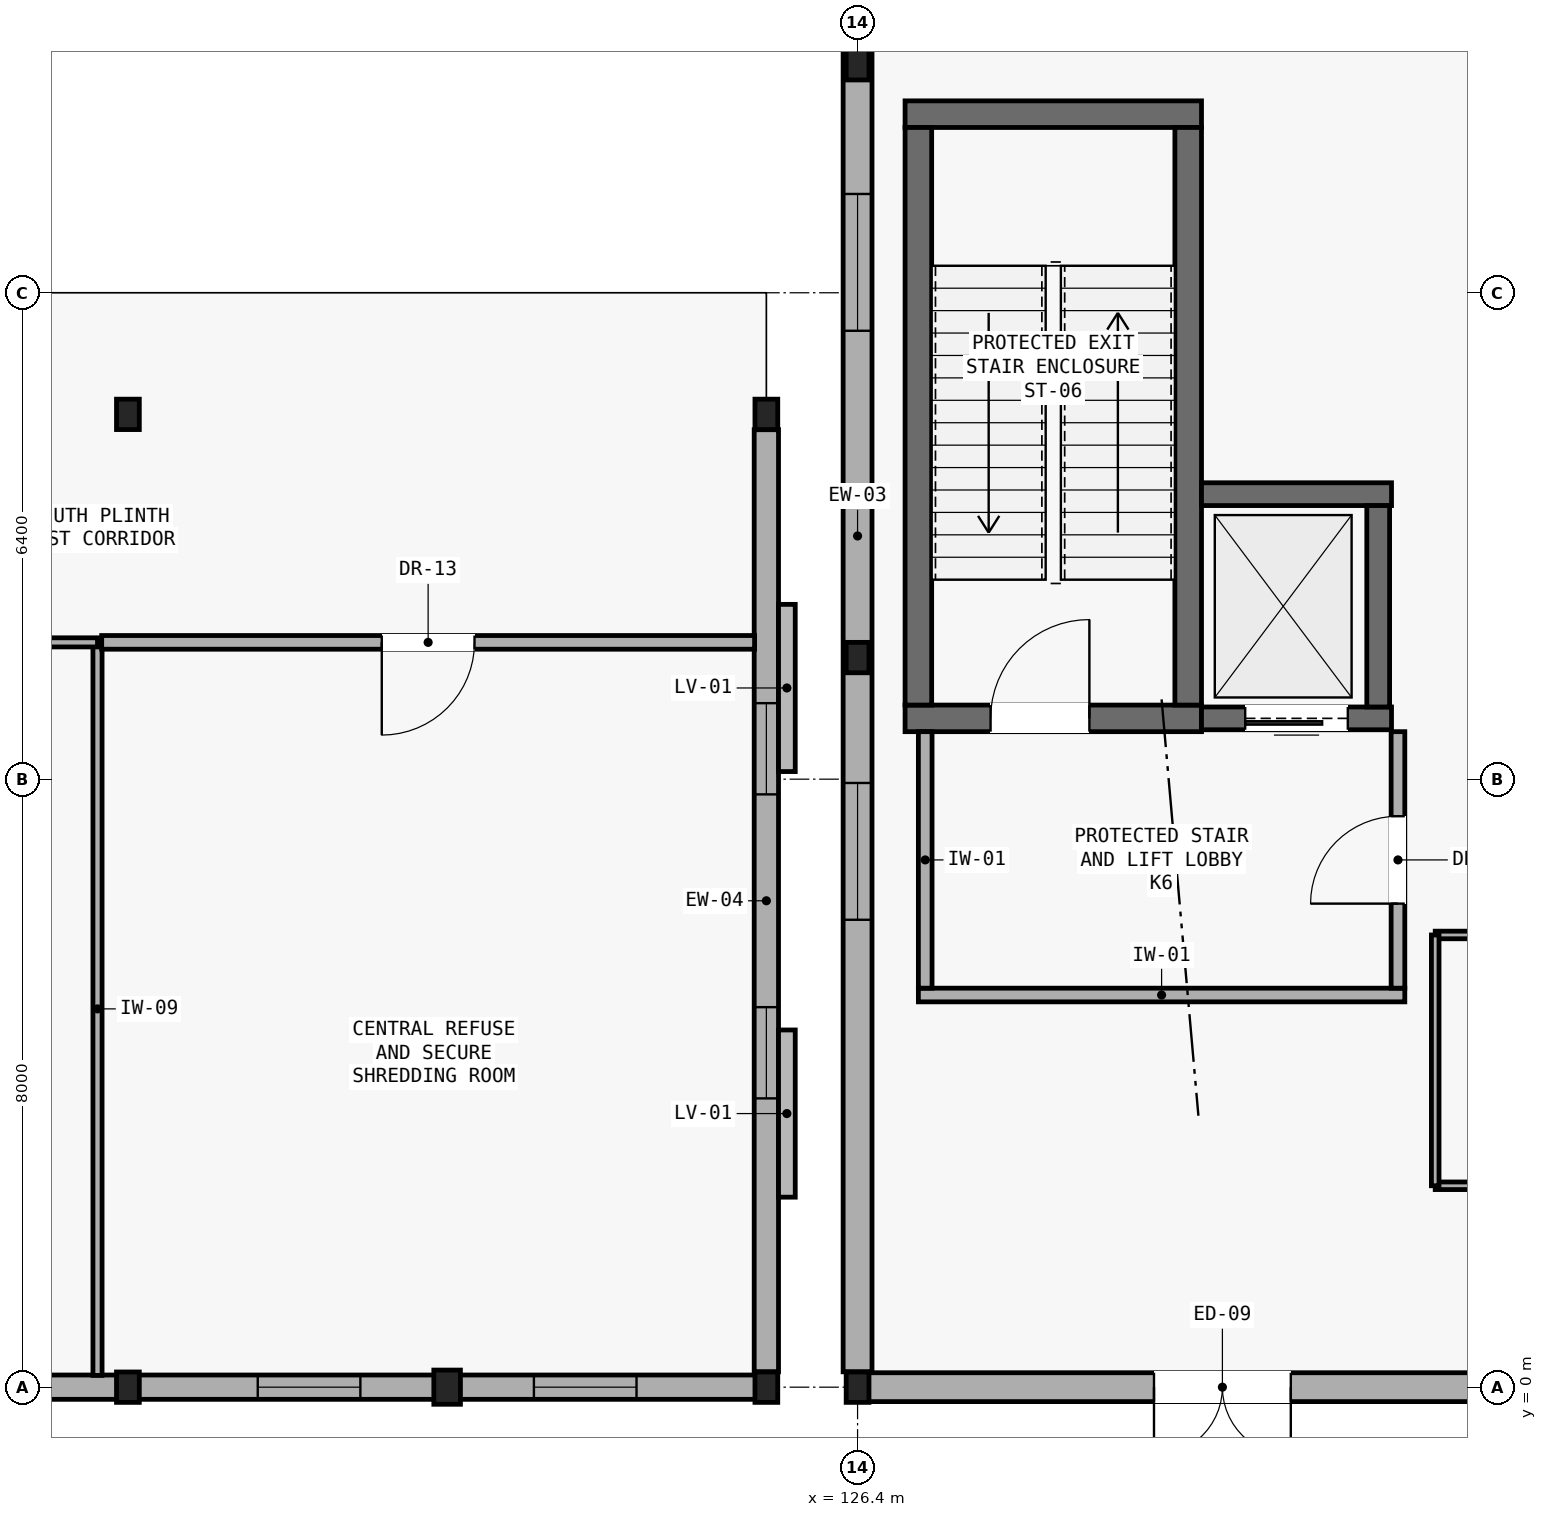
"""IFC4 building model, lengths in metres.
Left out: names, types, materials, properties, quantities, classifications, styles, units other than length and angle.
Written with IfcOpenShell. Run it as: python <this file> out.ifc"""

import sys

from ifc_helpers import new_model, si_unit, direction, frame, frame_2d, origin, origin_2d, place, context, subcontext, project, spatial, rectangle, i_section, extrude, element, fill, save


model = new_model("IFC4")
c1 = context("Model", 3, precision=1e-05, world=origin(), true_north=direction((0.0, 1.0)))
c2 = subcontext(c1, "Body", "Model", "MODEL_VIEW")
j1 = project(units=[si_unit("LENGTHUNIT", "METRE"), si_unit("PLANEANGLEUNIT", "RADIAN")], contexts=[c1])
p1 = place(None, origin())
s1 = spatial("IfcSite", under=j1, at=p1, CompositionType="ELEMENT")
p2 = place(p1, origin())
s2 = spatial("IfcBuilding", under=s1, at=p2, CompositionType="ELEMENT")
p3 = place(p2, origin())
s3 = spatial("IfcBuildingStorey", under=s2, at=p3, CompositionType="ELEMENT", Elevation=0.0)
for number, where, z_axis, x_axis in (
    (1, (126.4, 0.0, -0.27), (0.0, 0.0, 1.0), (1.0, 0.0, 0.0)),
    (2, (126.4, 9.6, -0.27), (0.0, 0.0, 1.0), (1.0, 0.0, 0.0)),
    (3, (126.4, 17.4, -0.27), (0.0, 0.0, 1.0), (1.0, 0.0, 0.0)),
    (4, (116.8, 0.0, -0.27), (0.0, 0.0, 1.0), (1.0, 0.0, 0.0)),
    (5, (116.8, 12.8, -0.27), (0.0, 0.0, 1.0), (1.0, 0.0, 0.0)),
    (6, (125.2, 0.0, -0.27), (0.0, 0.0, 1.0), (1.0, 0.0, 0.0)),
    (7, (125.2, 12.8, -0.27), (0.0, 0.0, 1.0), (1.0, 0.0, 0.0)),
):
    element("IfcColumn", number, at=place(p3, frame(where, z_axis=z_axis, x_axis=x_axis)), inside=s3, PredefinedType="COLUMN", context=c2, shape_type="SweptSolid", body=[
        extrude(i_section(OverallWidth=0.3, OverallDepth=0.4, WebThickness=0.013, FlangeThickness=0.024, FilletRadius=0.027, at=origin_2d()), origin(), (0.0, 0.0, 1.0), 5.52),
    ])
p4 = place(p3, frame((121.0, 0.0, -0.27), z_axis=(0.0, 0.0, 1.0), x_axis=(1.0, 0.0, 0.0)))
e8 = element("IfcColumn", 8, at=p4, inside=s3, PredefinedType="PILASTER", context=c2, shape_type="SweptSolid", body=[
    extrude(rectangle(XDim=0.35, YDim=0.45, at=origin_2d()), origin(), (0.0, 0.0, 1.0), 5.27),
])
p5 = place(p3, frame((126.409, 0.0, 0.0), z_axis=(0.0, 0.0, 1.0), x_axis=(1.0, 0.0, 0.0)))
e9 = element("IfcWall", 9, at=p5, inside=s3, PredefinedType="SOLIDWALL", context=c2, shape_type="SweptSolid", body=[
    extrude(rectangle(XDim=9.583, YDim=0.38, at=frame_2d((4.791, 0.0))), origin(), (0.0, 0.0, 1.0), 4.67),
])
p6 = place(p5, frame((3.891, 0.0, 0.0)))
e10 = element("IfcOpeningElement", 10, at=p6, cuts=e9, PredefinedType="OPENING", context=c2, shape_type="SweptSolid", body=[
    extrude(rectangle(XDim=1.8, YDim=2.2, at=frame_2d((0.9, 1.1))), frame((0.0, 0.2, 0.0), z_axis=(0.0, -1.0, 0.0), x_axis=(1.0, 0.0, 0.0)), (0.0, 0.0, 1.0), 0.4),
])
p7 = place(p3, frame((126.4, 0.202, 0.0), z_axis=(0.0, 0.0, 1.0), x_axis=(0.0, 1.0, 0.0)))
e11 = element("IfcWall", 11, at=p7, inside=s3, PredefinedType="SOLIDWALL", context=c2, shape_type="SweptSolid", body=[
    extrude(rectangle(XDim=21.996, YDim=0.38, at=frame_2d((10.998, 0.0))), origin(), (0.0, 0.0, 1.0), 4.54),
])
p8 = place(p7, frame((5.948, 0.0, 1.7)))
e12 = element("IfcOpeningElement", 12, at=p8, cuts=e11, PredefinedType="OPENING", context=c2, shape_type="SweptSolid", body=[
    extrude(rectangle(XDim=1.8, YDim=0.85, at=frame_2d((0.9, 0.425))), frame((0.0, 0.2, 0.0), z_axis=(0.0, -1.0, 0.0), x_axis=(1.0, 0.0, 0.0)), (0.0, 0.0, 1.0), 0.4),
])
p9 = place(p7, frame((13.698, 0.0, 1.7)))
e13 = element("IfcOpeningElement", 13, at=p9, cuts=e11, PredefinedType="OPENING", context=c2, shape_type="SweptSolid", body=[
    extrude(rectangle(XDim=1.8, YDim=0.85, at=frame_2d((0.9, 0.425))), frame((0.0, 0.2, 0.0), z_axis=(0.0, -1.0, 0.0), x_axis=(1.0, 0.0, 0.0)), (0.0, 0.0, 1.0), 0.4),
])
p10 = place(p3, frame((108.809, 0.0, 0.0), z_axis=(0.0, 0.0, 1.0), x_axis=(1.0, 0.0, 0.0)))
e14 = element("IfcWall", 14, at=p10, inside=s3, PredefinedType="SOLIDWALL", context=c2, shape_type="SweptSolid", body=[
    extrude(rectangle(XDim=7.982, YDim=0.32, at=frame_2d((3.991, 0.0))), origin(), (0.0, 0.0, 1.0), 4.67),
])
p11 = place(p10, frame((3.391, 0.0, 0.9)))
e15 = element("IfcOpeningElement", 15, at=p11, cuts=e14, PredefinedType="OPENING", context=c2, shape_type="SweptSolid", body=[
    extrude(rectangle(XDim=1.2, YDim=1.55, at=frame_2d((0.6, 0.775))), frame((0.0, 0.17, 0.0), z_axis=(0.0, -1.0, 0.0), x_axis=(1.0, 0.0, 0.0)), (0.0, 0.0, 1.0), 0.34),
])
p12 = place(p3, frame((116.809, 0.0, 0.0), z_axis=(0.0, 0.0, 1.0), x_axis=(1.0, 0.0, 0.0)))
e16 = element("IfcWall", 16, at=p12, inside=s3, PredefinedType="SOLIDWALL", context=c2, shape_type="SweptSolid", body=[
    extrude(rectangle(XDim=8.382, YDim=0.32, at=frame_2d((4.191, 0.0))), origin(), (0.0, 0.0, 1.0), 4.67),
])
p13 = place(p12, frame((1.7, 0.0, 0.9)))
e17 = element("IfcOpeningElement", 17, at=p13, cuts=e16, PredefinedType="OPENING", context=c2, shape_type="SweptSolid", body=[
    extrude(rectangle(XDim=1.35, YDim=1.55, at=frame_2d((0.675, 0.775))), frame((0.0, 0.17, 0.0), z_axis=(0.0, -1.0, 0.0), x_axis=(1.0, 0.0, 0.0)), (0.0, 0.0, 1.0), 0.34),
])
p14 = place(p12, frame((5.333, 0.0, 0.9)))
e18 = element("IfcOpeningElement", 18, at=p14, cuts=e16, PredefinedType="OPENING", context=c2, shape_type="SweptSolid", body=[
    extrude(rectangle(XDim=1.35, YDim=1.55, at=frame_2d((0.675, 0.775))), frame((0.0, 0.17, 0.0), z_axis=(0.0, -1.0, 0.0), x_axis=(1.0, 0.0, 0.0)), (0.0, 0.0, 1.0), 0.34),
])
p15 = place(p3, frame((125.2, 0.202, 0.0), z_axis=(0.0, 0.0, 1.0), x_axis=(0.0, 1.0, 0.0)))
e19 = element("IfcWall", 19, at=p15, inside=s3, PredefinedType="SOLIDWALL", context=c2, shape_type="SweptSolid", body=[
    extrude(rectangle(XDim=12.396, YDim=0.32, at=frame_2d((6.198, 0.0))), origin(), (0.0, 0.0, 1.0), 4.59),
])
p16 = place(p15, frame((3.598, 0.0, 0.9)))
e20 = element("IfcOpeningElement", 20, at=p16, cuts=e19, PredefinedType="OPENING", context=c2, shape_type="SweptSolid", body=[
    extrude(rectangle(XDim=1.2, YDim=1.15, at=frame_2d((0.6, 0.575))), frame((0.0, 0.17, 0.0), z_axis=(0.0, -1.0, 0.0), x_axis=(1.0, 0.0, 0.0)), (0.0, 0.0, 1.0), 0.34),
])
p17 = place(p15, frame((7.598, 0.0, 0.9)))
e21 = element("IfcOpeningElement", 21, at=p17, cuts=e19, PredefinedType="OPENING", context=c2, shape_type="SweptSolid", body=[
    extrude(rectangle(XDim=1.2, YDim=1.15, at=frame_2d((0.6, 0.575))), frame((0.0, 0.17, 0.0), z_axis=(0.0, -1.0, 0.0), x_axis=(1.0, 0.0, 0.0)), (0.0, 0.0, 1.0), 0.34),
])
p18 = place(p3, frame((127.025, 8.8, -0.27), z_axis=(0.0, 0.0, 1.0), x_axis=(1.0, 0.0, 0.0)))
e22 = element("IfcWall", 22, at=p18, inside=s3, PredefinedType="SHEAR", context=c2, shape_type="SweptSolid", body=[
    extrude(rectangle(XDim=3.9, YDim=0.35, at=frame_2d((1.95, 0.0))), origin(), (0.0, 0.0, 1.0), 5.27),
])
p19 = place(p18, frame((1.125, 0.0, 0.27)))
e23 = element("IfcOpeningElement", 23, at=p19, cuts=e22, PredefinedType="OPENING", context=c2, shape_type="SweptSolid", body=[
    extrude(rectangle(XDim=1.3, YDim=2.15, at=frame_2d((0.65, 1.075))), frame((0.0, 0.185, 0.0), z_axis=(0.0, -1.0, 0.0), x_axis=(1.0, 0.0, 0.0)), (0.0, 0.0, 1.0), 0.37),
])
p20 = place(p3, frame((127.025, 16.75, -0.27), z_axis=(0.0, 0.0, 1.0), x_axis=(1.0, 0.0, 0.0)))
e24 = element("IfcWall", 24, at=p20, inside=s3, PredefinedType="SHEAR", context=c2, shape_type="SweptSolid", body=[
    extrude(rectangle(XDim=3.9, YDim=0.35, at=frame_2d((1.95, 0.0))), origin(), (0.0, 0.0, 1.0), 5.27),
])
for number, where, z_axis, x_axis in (
    (25, (127.2, 8.975, -0.27), (0.0, 0.0, 1.0), (0.0, 1.0, 0.0)),
    (26, (130.75, 8.975, -0.27), (0.0, 0.0, 1.0), (0.0, 1.0, 0.0)),
):
    element("IfcWall", number, at=place(p3, frame(where, z_axis=z_axis, x_axis=x_axis)), inside=s3, PredefinedType="SHEAR", context=c2, shape_type="SweptSolid", body=[
        extrude(rectangle(XDim=7.6, YDim=0.35, at=frame_2d((3.8, 0.0))), origin(), (0.0, 0.0, 1.0), 5.27),
    ])
p21 = place(p3, frame((130.925, 8.8, -0.27), z_axis=(0.0, 0.0, 1.0), x_axis=(1.0, 0.0, 0.0)))
e27 = element("IfcWall", 27, at=p21, inside=s3, PredefinedType="SHEAR", context=c2, shape_type="SweptSolid", body=[
    extrude(rectangle(XDim=2.5, YDim=0.3, at=frame_2d((1.25, 0.0))), origin(), (0.0, 0.0, 1.0), 5.27),
])
p22 = place(p21, frame((0.575, 0.0, 0.27)))
e28 = element("IfcOpeningElement", 28, at=p22, cuts=e27, PredefinedType="OPENING", context=c2, shape_type="SweptSolid", body=[
    extrude(rectangle(XDim=1.35, YDim=2.15, at=frame_2d((0.675, 1.075))), frame((0.0, 0.16, 0.0), z_axis=(0.0, -1.0, 0.0), x_axis=(1.0, 0.0, 0.0)), (0.0, 0.0, 1.0), 0.32),
])
p23 = place(p3, frame((130.925, 11.75, -0.27), z_axis=(0.0, 0.0, 1.0), x_axis=(1.0, 0.0, 0.0)))
e29 = element("IfcWall", 29, at=p23, inside=s3, PredefinedType="SHEAR", context=c2, shape_type="SweptSolid", body=[
    extrude(rectangle(XDim=2.5, YDim=0.3, at=frame_2d((1.25, 0.0))), origin(), (0.0, 0.0, 1.0), 5.27),
])
p24 = place(p3, frame((133.25, 8.95, -0.27), z_axis=(0.0, 0.0, 1.0), x_axis=(0.0, 1.0, 0.0)))
e30 = element("IfcWall", 30, at=p24, inside=s3, PredefinedType="SHEAR", context=c2, shape_type="SweptSolid", body=[
    extrude(rectangle(XDim=2.65, YDim=0.3, at=frame_2d((1.325, 0.0))), origin(), (0.0, 0.0, 1.0), 5.27),
])
p25 = place(p3, frame((127.2, 5.16, 0.0), z_axis=(0.0, 0.0, 1.0), x_axis=(1.0, 0.0, 0.0)))
e31 = element("IfcWall", 31, at=p25, inside=s3, PredefinedType="PARTITIONING", context=c2, shape_type="SweptSolid", body=[
    extrude(rectangle(XDim=6.4, YDim=0.18, at=frame_2d((3.2, 0.0))), origin(), (0.0, 0.0, 1.0), 5.0),
])
p26 = place(p3, frame((127.29, 5.25, 0.0), z_axis=(0.0, 0.0, 1.0), x_axis=(0.0, 1.0, 0.0)))
e32 = element("IfcWall", 32, at=p26, inside=s3, PredefinedType="PARTITIONING", context=c2, shape_type="SweptSolid", body=[
    extrude(rectangle(XDim=3.375, YDim=0.18, at=frame_2d((1.688, 0.0))), origin(), (0.0, 0.0, 1.0), 5.0),
])
p27 = place(p3, frame((133.51, 5.25, 0.0), z_axis=(0.0, 0.0, 1.0), x_axis=(0.0, 1.0, 0.0)))
e33 = element("IfcWall", 33, at=p27, inside=s3, PredefinedType="PARTITIONING", context=c2, shape_type="SweptSolid", body=[
    extrude(rectangle(XDim=3.375, YDim=0.18, at=frame_2d((1.688, 0.0))), origin(), (0.0, 0.0, 1.0), 5.0),
])
p28 = place(p27, frame((1.113, 0.0, 0.0)))
e34 = element("IfcOpeningElement", 34, at=p28, cuts=e33, PredefinedType="OPENING", context=c2, shape_type="SweptSolid", body=[
    extrude(rectangle(XDim=1.15, YDim=2.15, at=frame_2d((0.575, 1.075))), frame((0.0, 0.1, 0.0), z_axis=(0.0, -1.0, 0.0), x_axis=(1.0, 0.0, 0.0)), (0.0, 0.0, 1.0), 0.2),
])
p29 = place(p3, frame((134.0, 2.65, 0.0), z_axis=(0.0, 0.0, 1.0), x_axis=(1.0, 0.0, 0.0)))
e35 = element("IfcWall", 35, at=p29, inside=s3, PredefinedType="PARTITIONING", context=c2, shape_type="SweptSolid", body=[
    extrude(rectangle(XDim=2.6, YDim=0.1, at=frame_2d((1.3, 0.0))), origin(), (0.0, 0.0, 1.0), 5.0),
])
p30 = place(p3, frame((136.6, 5.95, 0.0), z_axis=(0.0, 0.0, 1.0), x_axis=(-1.0, 0.0, 0.0)))
e36 = element("IfcWall", 36, at=p30, inside=s3, PredefinedType="PARTITIONING", context=c2, shape_type="SweptSolid", body=[
    extrude(rectangle(XDim=2.6, YDim=0.1, at=frame_2d((1.3, 0.0))), origin(), (0.0, 0.0, 1.0), 5.0),
])
p31 = place(p30, frame((0.8, 0.0, 0.0)))
e37 = element("IfcOpeningElement", 37, at=p31, cuts=e36, PredefinedType="OPENING", context=c2, shape_type="SweptSolid", body=[
    extrude(rectangle(XDim=1.0, YDim=2.08, at=frame_2d((0.5, 1.04))), frame((0.0, 0.06, 0.0), z_axis=(0.0, -1.0, 0.0), x_axis=(1.0, 0.0, 0.0)), (0.0, 0.0, 1.0), 0.12),
])
p32 = place(p3, frame((134.0, 5.95, 0.0), z_axis=(0.0, 0.0, 1.0), x_axis=(0.0, -1.0, 0.0)))
e38 = element("IfcWall", 38, at=p32, inside=s3, PredefinedType="PARTITIONING", context=c2, shape_type="SweptSolid", body=[
    extrude(rectangle(XDim=3.3, YDim=0.1, at=frame_2d((1.65, 0.0))), origin(), (0.0, 0.0, 1.0), 5.0),
])
p33 = place(p3, frame((116.4, 0.155, 0.0), z_axis=(0.0, 0.0, 1.0), x_axis=(0.0, 1.0, 0.0)))
e39 = element("IfcWall", 39, at=p33, inside=s3, PredefinedType="PARTITIONING", context=c2, shape_type="SweptSolid", body=[
    extrude(rectangle(XDim=9.645, YDim=0.12, at=frame_2d((4.823, 0.0))), origin(), (0.0, 0.0, 1.0), 5.0),
])
p34 = place(p3, frame((116.4, 9.8, 0.0), z_axis=(0.0, 0.0, 1.0), x_axis=(-1.0, 0.0, 0.0)))
e40 = element("IfcWall", 40, at=p34, inside=s3, PredefinedType="PARTITIONING", context=c2, shape_type="SweptSolid", body=[
    extrude(rectangle(XDim=39.2, YDim=0.12, at=frame_2d((19.6, 0.0))), origin(), (0.0, 0.0, 1.0), 5.0),
])
p35 = place(p34, frame((18.83, 0.0, 0.0)))
e41 = element("IfcOpeningElement", 41, at=p35, cuts=e40, PredefinedType="OPENING", context=c2, shape_type="SweptSolid", body=[
    extrude(rectangle(XDim=1.54, YDim=2.2, at=frame_2d((0.77, 1.1))), frame((0.0, 0.07, 0.0), z_axis=(0.0, -1.0, 0.0), x_axis=(1.0, 0.0, 0.0)), (0.0, 0.0, 1.0), 0.14),
])
p36 = place(p3, frame((125.045, 9.8, 0.0), z_axis=(0.0, 0.0, 1.0), x_axis=(-1.0, 0.0, 0.0)))
e42 = element("IfcWall", 42, at=p36, inside=s3, PredefinedType="PARTITIONING", context=c2, shape_type="SweptSolid", body=[
    extrude(rectangle(XDim=8.59, YDim=0.18, at=frame_2d((4.295, 0.0))), origin(), (0.0, 0.0, 1.0), 5.0),
])
p37 = place(p36, frame((3.685, 0.0, 0.0)))
e43 = element("IfcOpeningElement", 43, at=p37, cuts=e42, PredefinedType="OPENING", context=c2, shape_type="SweptSolid", body=[
    extrude(rectangle(XDim=1.22, YDim=2.1, at=frame_2d((0.61, 1.05))), frame((0.0, 0.1, 0.0), z_axis=(0.0, -1.0, 0.0), x_axis=(1.0, 0.0, 0.0)), (0.0, 0.0, 1.0), 0.2),
])
p38 = place(p6, frame((1.8, 0.0, 0.0), z_axis=(0.0, 0.0, 1.0), x_axis=(-1.0, 0.0, 0.0)))
e44 = element("IfcDoor", 44, at=p38, inside=s3, OperationType="SINGLE_SWING_LEFT", PredefinedType="DOOR", context=c2, shape_type="SweptSolid", body=[
    extrude(rectangle(XDim=1.8, YDim=2.2, at=frame_2d((0.9, 1.1))), frame((0.0, 0.025, 0.0), z_axis=(0.0, -1.0, 0.0), x_axis=(1.0, 0.0, 0.0)), (0.0, 0.0, 1.0), 0.05),
])
fill(e10, e44)
p39 = place(p8, origin())
e45 = element("IfcWindow", 45, at=p39, inside=s3, PartitioningType="SINGLE_PANEL", PredefinedType="WINDOW", context=c2, shape_type="SweptSolid", body=[
    extrude(rectangle(XDim=1.8, YDim=0.85, at=frame_2d((0.9, 0.425))), frame((0.0, 0.03, 0.0), z_axis=(0.0, -1.0, 0.0), x_axis=(1.0, 0.0, 0.0)), (0.0, 0.0, 1.0), 0.06),
])
fill(e12, e45)
p40 = place(p9, origin())
e46 = element("IfcWindow", 46, at=p40, inside=s3, PartitioningType="SINGLE_PANEL", PredefinedType="WINDOW", context=c2, shape_type="SweptSolid", body=[
    extrude(rectangle(XDim=1.8, YDim=0.85, at=frame_2d((0.9, 0.425))), frame((0.0, 0.03, 0.0), z_axis=(0.0, -1.0, 0.0), x_axis=(1.0, 0.0, 0.0)), (0.0, 0.0, 1.0), 0.06),
])
fill(e13, e46)
p41 = place(p13, origin())
e47 = element("IfcWindow", 47, at=p41, inside=s3, PartitioningType="SINGLE_PANEL", PredefinedType="WINDOW", context=c2, shape_type="SweptSolid", body=[
    extrude(rectangle(XDim=1.35, YDim=1.55, at=frame_2d((0.675, 0.775))), frame((0.0, 0.03, 0.0), z_axis=(0.0, -1.0, 0.0), x_axis=(1.0, 0.0, 0.0)), (0.0, 0.0, 1.0), 0.06),
])
fill(e17, e47)
p42 = place(p14, origin())
e48 = element("IfcWindow", 48, at=p42, inside=s3, PartitioningType="SINGLE_PANEL", PredefinedType="WINDOW", context=c2, shape_type="SweptSolid", body=[
    extrude(rectangle(XDim=1.35, YDim=1.55, at=frame_2d((0.675, 0.775))), frame((0.0, 0.03, 0.0), z_axis=(0.0, -1.0, 0.0), x_axis=(1.0, 0.0, 0.0)), (0.0, 0.0, 1.0), 0.06),
])
fill(e18, e48)
p43 = place(p16, origin())
e49 = element("IfcWindow", 49, at=p43, inside=s3, PartitioningType="SINGLE_PANEL", PredefinedType="WINDOW", context=c2, shape_type="SweptSolid", body=[
    extrude(rectangle(XDim=1.2, YDim=1.15, at=frame_2d((0.6, 0.575))), frame((0.0, 0.03, 0.0), z_axis=(0.0, -1.0, 0.0), x_axis=(1.0, 0.0, 0.0)), (0.0, 0.0, 1.0), 0.06),
])
fill(e20, e49)
p44 = place(p17, origin())
e50 = element("IfcWindow", 50, at=p44, inside=s3, PartitioningType="SINGLE_PANEL", PredefinedType="WINDOW", context=c2, shape_type="SweptSolid", body=[
    extrude(rectangle(XDim=1.2, YDim=1.15, at=frame_2d((0.6, 0.575))), frame((0.0, 0.03, 0.0), z_axis=(0.0, -1.0, 0.0), x_axis=(1.0, 0.0, 0.0)), (0.0, 0.0, 1.0), 0.06),
])
fill(e21, e50)
p45 = place(p19, origin())
e51 = element("IfcDoor", 51, at=p45, inside=s3, OperationType="SINGLE_SWING_RIGHT", PredefinedType="DOOR", context=c2, shape_type="SweptSolid", body=[
    extrude(rectangle(XDim=1.3, YDim=2.15, at=frame_2d((0.65, 1.075))), frame((0.0, 0.025, 0.0), z_axis=(0.0, -1.0, 0.0), x_axis=(1.0, 0.0, 0.0)), (0.0, 0.0, 1.0), 0.05),
])
fill(e23, e51)
p46 = place(p22, frame((1.35, 0.0, 0.0), z_axis=(0.0, 0.0, 1.0), x_axis=(-1.0, 0.0, 0.0)))
e52 = element("IfcDoor", 52, at=p46, inside=s3, OperationType="SLIDING_TO_RIGHT", PredefinedType="DOOR", context=c2, shape_type="SweptSolid", body=[
    extrude(rectangle(XDim=1.35, YDim=2.15, at=frame_2d((0.675, 1.075))), frame((0.0, 0.025, 0.0), z_axis=(0.0, -1.0, 0.0), x_axis=(1.0, 0.0, 0.0)), (0.0, 0.0, 1.0), 0.05),
])
fill(e28, e52)
p47 = place(p28, origin())
e53 = element("IfcDoor", 53, at=p47, inside=s3, OperationType="SINGLE_SWING_LEFT", PredefinedType="DOOR", context=c2, shape_type="SweptSolid", body=[
    extrude(rectangle(XDim=1.15, YDim=2.15, at=frame_2d((0.575, 1.075))), frame((0.0, 0.025, 0.0), z_axis=(0.0, -1.0, 0.0), x_axis=(1.0, 0.0, 0.0)), (0.0, 0.0, 1.0), 0.05),
])
fill(e34, e53)
p48 = place(p37, origin())
e54 = element("IfcDoor", 54, at=p48, inside=s3, OperationType="SINGLE_SWING_RIGHT", PredefinedType="DOOR", context=c2, shape_type="SweptSolid", body=[
    extrude(rectangle(XDim=1.22, YDim=2.1, at=frame_2d((0.61, 1.05))), frame((0.0, 0.025, 0.0), z_axis=(0.0, -1.0, 0.0), x_axis=(1.0, 0.0, 0.0)), (0.0, 0.0, 1.0), 0.05),
])
fill(e43, e54)
save(model, sys.argv[1])
